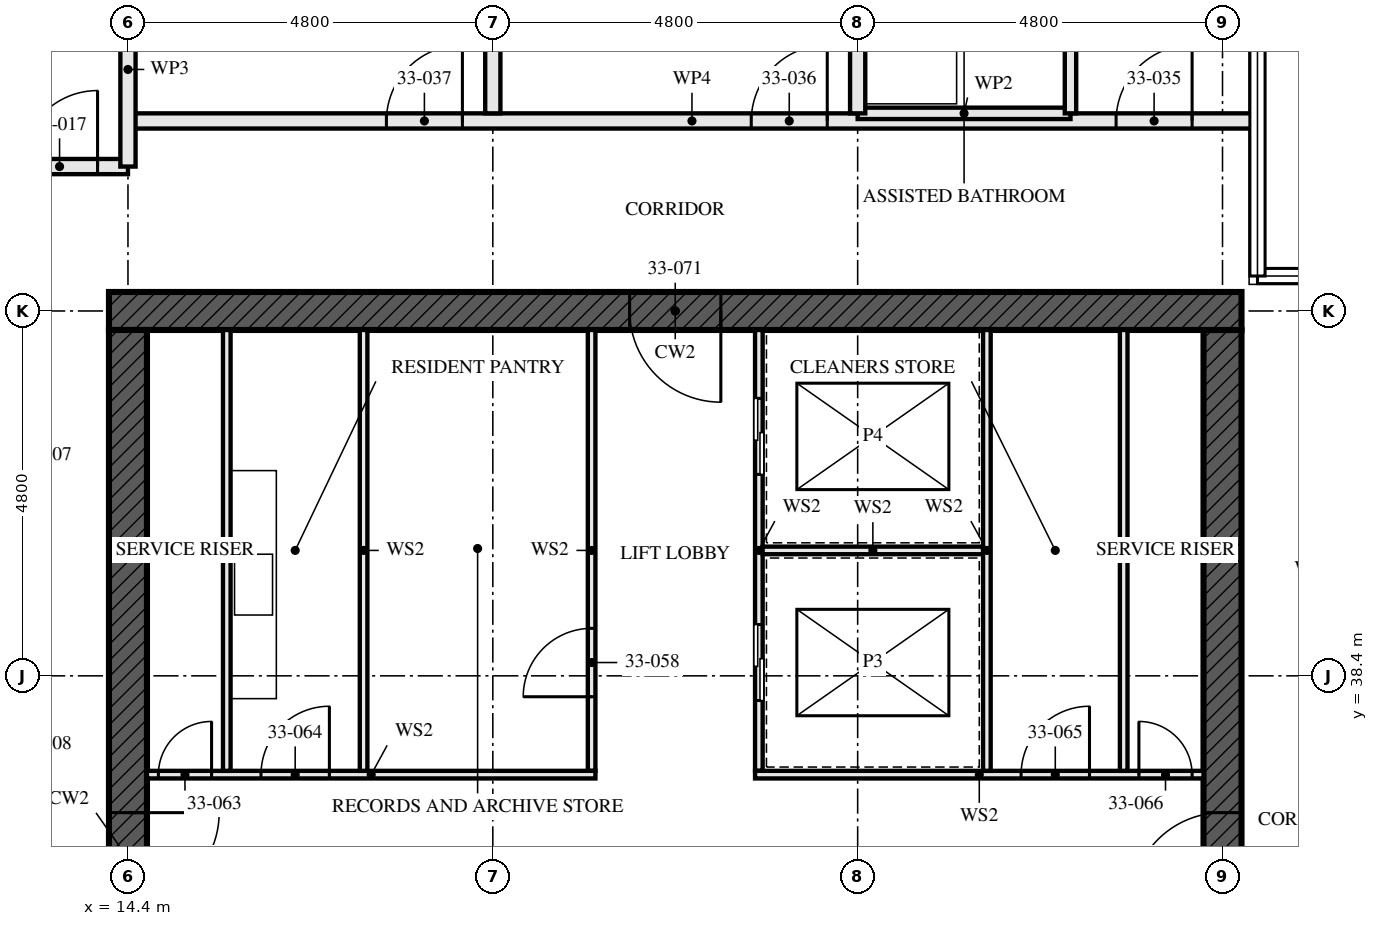
"""IFC4 building model, lengths in metres.
Left out: names, types, materials, properties, quantities, classifications, styles, units other than length and angle.
Written with IfcOpenShell. Run it as: python <this file> out.ifc"""

import sys

from ifc_helpers import new_model, si_unit, direction, frame, frame_2d, origin, place, context, subcontext, project, spatial, rectangle, extrude, element, fill, save


model = new_model("IFC4")
c1 = context("Model", 3, precision=1e-05, world=origin(), true_north=direction((0.0, 1.0)))
c2 = subcontext(c1, "Body", "Model", "MODEL_VIEW")
j1 = project(units=[si_unit("LENGTHUNIT", "METRE"), si_unit("PLANEANGLEUNIT", "RADIAN")], contexts=[c1])
p1 = place(None, origin())
s1 = spatial("IfcSite", under=j1, at=p1, CompositionType="ELEMENT")
p2 = place(p1, origin())
s2 = spatial("IfcBuilding", under=s1, at=p2, CompositionType="ELEMENT")
p3 = place(p2, frame((0.0, 0.0, 122.5)))
s3 = spatial("IfcBuildingStorey", under=s2, at=p3, CompositionType="ELEMENT", Elevation=122.5)
p4 = place(p3, frame((29.05, 43.2, -0.17), z_axis=(0.0, 0.0, 1.0), x_axis=(-1.0, 0.0, 0.0)))
e1 = element("IfcWall", 1, at=p4, inside=s3, PredefinedType="SHEAR", context=c2, shape_type="SweptSolid", body=[
    extrude(rectangle(XDim=14.9, YDim=0.5, at=frame_2d((7.45, 0.0))), origin(), (0.0, 0.0, 1.0), 3.5),
])
p5 = place(p4, frame((6.85, 0.0, 0.17)))
e2 = element("IfcOpeningElement", 2, at=p5, cuts=e1, PredefinedType="OPENING", context=c2, shape_type="SweptSolid", body=[
    extrude(rectangle(XDim=1.2, YDim=2.1, at=frame_2d((0.6, 1.05))), frame((0.0, 0.26, 0.0), z_axis=(0.0, -1.0, 0.0), x_axis=(1.0, 0.0, 0.0)), (0.0, 0.0, 1.0), 0.521),
])
p6 = place(p3, frame((14.4, 42.95, -0.17), z_axis=(0.0, 0.0, 1.0), x_axis=(0.0, -1.0, 0.0)))
e3 = element("IfcWall", 3, at=p6, inside=s3, PredefinedType="SHEAR", context=c2, shape_type="SweptSolid", body=[
    extrude(rectangle(XDim=13.9, YDim=0.5, at=frame_2d((6.95, 0.0))), origin(), (0.0, 0.0, 1.0), 3.5),
])
p7 = place(p6, frame((6.35, 0.0, 0.17)))
e4 = element("IfcOpeningElement", 4, at=p7, cuts=e3, PredefinedType="OPENING", context=c2, shape_type="SweptSolid", body=[
    extrude(rectangle(XDim=1.2, YDim=2.1, at=frame_2d((0.6, 1.05))), frame((0.0, 0.26, 0.0), z_axis=(0.0, -1.0, 0.0), x_axis=(1.0, 0.0, 0.0)), (0.0, 0.0, 1.0), 0.521),
])
p8 = place(p3, frame((28.8, 29.05, -0.17), z_axis=(0.0, 0.0, 1.0), x_axis=(0.0, 1.0, 0.0)))
e5 = element("IfcWall", 5, at=p8, inside=s3, PredefinedType="SHEAR", context=c2, shape_type="SweptSolid", body=[
    extrude(rectangle(XDim=13.9, YDim=0.5, at=frame_2d((6.95, 0.0))), origin(), (0.0, 0.0, 1.0), 3.5),
])
p9 = place(p8, frame((6.35, 0.0, 0.17)))
e6 = element("IfcOpeningElement", 6, at=p9, cuts=e5, PredefinedType="OPENING", context=c2, shape_type="SweptSolid", body=[
    extrude(rectangle(XDim=1.2, YDim=2.1, at=frame_2d((0.6, 1.05))), frame((0.0, 0.26, 0.0), z_axis=(0.0, -1.0, 0.0), x_axis=(1.0, 0.0, 0.0)), (0.0, 0.0, 1.0), 0.521),
])
p10 = place(p3, frame((14.4, 45.1, 0.0), z_axis=(0.0, 0.0, 1.0), x_axis=(-1.0, 0.0, 0.0)))
e7 = element("IfcWall", 7, at=p10, inside=s3, PredefinedType="PARTITIONING", context=c2, shape_type="SweptSolid", body=[
    extrude(rectangle(XDim=9.6, YDim=0.2, at=frame_2d((4.8, 0.0))), origin(), (0.0, 0.0, 1.0), 3.33),
])
p11 = place(p10, frame((0.4, 0.0, 0.0)))
e8 = element("IfcOpeningElement", 8, at=p11, cuts=e7, PredefinedType="OPENING", context=c2, shape_type="SweptSolid", body=[
    extrude(rectangle(XDim=1.0, YDim=2.1, at=frame_2d((0.5, 1.05))), frame((0.0, 0.111, 0.0), z_axis=(0.0, -1.0, 0.0), x_axis=(1.0, 0.0, 0.0)), (0.0, 0.0, 1.0), 0.221),
])
p12 = place(p10, frame((5.2, 0.0, 0.0)))
e9 = element("IfcOpeningElement", 9, at=p12, cuts=e7, PredefinedType="OPENING", context=c2, shape_type="SweptSolid", body=[
    extrude(rectangle(XDim=1.0, YDim=2.1, at=frame_2d((0.5, 1.05))), frame((0.0, 0.111, 0.0), z_axis=(0.0, -1.0, 0.0), x_axis=(1.0, 0.0, 0.0)), (0.0, 0.0, 1.0), 0.221),
])
p13 = place(p3, frame((26.8, 48.8, 0.0), z_axis=(0.0, 0.0, 1.0), x_axis=(0.0, -1.0, 0.0)))
e10 = element("IfcWall", 10, at=p13, inside=s3, PredefinedType="PARTITIONING", context=c2, shape_type="SweptSolid", body=[
    extrude(rectangle(XDim=3.0, YDim=0.15, at=frame_2d((1.5, 0.0))), origin(), (0.0, 0.0, 1.0), 2.55),
])
p14 = place(p13, frame((1.05, 0.0, 0.0)))
e11 = element("IfcOpeningElement", 11, at=p14, cuts=e10, PredefinedType="OPENING", context=c2, shape_type="SweptSolid", body=[
    extrude(rectangle(XDim=0.9, YDim=2.1, at=frame_2d((0.45, 1.05))), frame((0.0, 0.085, 0.0), z_axis=(0.0, -1.0, 0.0), x_axis=(1.0, 0.0, 0.0)), (0.0, 0.0, 1.0), 0.171),
])
p15 = place(p3, frame((26.8, 45.8, 0.0), z_axis=(0.0, 0.0, 1.0), x_axis=(-1.0, 0.0, 0.0)))
e12 = element("IfcWall", 12, at=p15, inside=s3, PredefinedType="PARTITIONING", context=c2, shape_type="SweptSolid", body=[
    extrude(rectangle(XDim=2.8, YDim=0.15, at=frame_2d((1.4, 0.0))), origin(), (0.0, 0.0, 1.0), 3.33),
])
p16 = place(p3, frame((24.0, 52.48, 0.0), z_axis=(0.0, 0.0, 1.0), x_axis=(0.0, -1.0, 0.0)))
e13 = element("IfcWall", 13, at=p16, inside=s3, PredefinedType="PARTITIONING", context=c2, shape_type="SweptSolid", body=[
    extrude(rectangle(XDim=6.68, YDim=0.2, at=frame_2d((3.34, 0.0))), origin(), (0.0, 0.0, 1.0), 2.55),
])
p17 = place(p3, frame((19.2, 57.28, 0.0), z_axis=(0.0, 0.0, 1.0), x_axis=(0.0, -1.0, 0.0)))
e14 = element("IfcWall", 14, at=p17, inside=s3, PredefinedType="PARTITIONING", context=c2, shape_type="SweptSolid", body=[
    extrude(rectangle(XDim=11.48, YDim=0.2, at=frame_2d((5.74, 0.0))), origin(), (0.0, 0.0, 1.0), 2.55),
])
p18 = place(p3, frame((29.24, 45.7, 0.0), z_axis=(0.0, 0.0, 1.0), x_axis=(-1.0, 0.0, 0.0)))
e15 = element("IfcWall", 15, at=p18, inside=s3, PredefinedType="PARTITIONING", context=c2, shape_type="SweptSolid", body=[
    extrude(rectangle(XDim=14.84, YDim=0.2, at=frame_2d((7.42, 0.0))), origin(), (0.0, 0.0, 1.0), 2.32),
])
p19 = place(p18, frame((0.84, 0.0, 0.0)))
e16 = element("IfcOpeningElement", 16, at=p19, cuts=e15, PredefinedType="OPENING", context=c2, shape_type="SweptSolid", body=[
    extrude(rectangle(XDim=1.0, YDim=2.1, at=frame_2d((0.5, 1.05))), frame((0.0, 0.111, 0.0), z_axis=(0.0, -1.0, 0.0), x_axis=(1.0, 0.0, 0.0)), (0.0, 0.0, 1.0), 0.221),
])
p20 = place(p18, frame((5.64, 0.0, 0.0)))
e17 = element("IfcOpeningElement", 17, at=p20, cuts=e15, PredefinedType="OPENING", context=c2, shape_type="SweptSolid", body=[
    extrude(rectangle(XDim=1.0, YDim=2.1, at=frame_2d((0.5, 1.05))), frame((0.0, 0.111, 0.0), z_axis=(0.0, -1.0, 0.0), x_axis=(1.0, 0.0, 0.0)), (0.0, 0.0, 1.0), 0.221),
])
p21 = place(p18, frame((10.44, 0.0, 0.0)))
e18 = element("IfcOpeningElement", 18, at=p21, cuts=e15, PredefinedType="OPENING", context=c2, shape_type="SweptSolid", body=[
    extrude(rectangle(XDim=1.0, YDim=2.1, at=frame_2d((0.5, 1.05))), frame((0.0, 0.111, 0.0), z_axis=(0.0, -1.0, 0.0), x_axis=(1.0, 0.0, 0.0)), (0.0, 0.0, 1.0), 0.221),
])
for number, where, z_axis, x_axis in (
    (19, (15.7, 37.15, 0.0), (0.0, 0.0, 1.0), (0.0, 1.0, 0.0)),
    (20, (27.5, 37.15, 0.0), (0.0, 0.0, 1.0), (0.0, 1.0, 0.0)),
):
    element("IfcWall", number, at=place(p3, frame(where, z_axis=z_axis, x_axis=x_axis)), inside=s3, PredefinedType="SOLIDWALL", context=c2, shape_type="SweptSolid", body=[
        extrude(rectangle(XDim=5.8, YDim=0.1, at=frame_2d((2.9, 0.0))), origin(), (0.0, 0.0, 1.0), 3.33),
    ])
p22 = place(p3, frame((20.5, 37.15, 0.0), z_axis=(0.0, 0.0, 1.0), x_axis=(0.0, 1.0, 0.0)))
e21 = element("IfcWall", 21, at=p22, inside=s3, PredefinedType="SOLIDWALL", context=c2, shape_type="SweptSolid", body=[
    extrude(rectangle(XDim=5.8, YDim=0.1, at=frame_2d((2.9, 0.0))), origin(), (0.0, 0.0, 1.0), 3.33),
])
p23 = place(p22, frame((0.975, 0.0, 0.0)))
e22 = element("IfcOpeningElement", 22, at=p23, cuts=e21, PredefinedType="OPENING", context=c2, shape_type="SweptSolid", body=[
    extrude(rectangle(XDim=0.9, YDim=2.1, at=frame_2d((0.45, 1.05))), frame((0.0, 0.061, 0.0), z_axis=(0.0, -1.0, 0.0), x_axis=(1.0, 0.0, 0.0)), (0.0, 0.0, 1.0), 0.121),
])
p24 = place(p3, frame((22.7, 37.15, 0.0), z_axis=(0.0, 0.0, 1.0), x_axis=(0.0, 1.0, 0.0)))
e23 = element("IfcWall", 23, at=p24, inside=s3, PredefinedType="SOLIDWALL", context=c2, shape_type="SweptSolid", body=[
    extrude(rectangle(XDim=5.8, YDim=0.1, at=frame_2d((2.9, 0.0))), origin(), (0.0, 0.0, 1.0), 3.33),
])
p25 = place(p24, frame((0.925, 0.0, 0.0)))
e24 = element("IfcOpeningElement", 24, at=p25, cuts=e23, PredefinedType="OPENING", context=c2, shape_type="SweptSolid", body=[
    extrude(rectangle(XDim=1.0, YDim=2.1, at=frame_2d((0.5, 1.05))), frame((0.0, 0.061, 0.0), z_axis=(0.0, -1.0, 0.0), x_axis=(1.0, 0.0, 0.0)), (0.0, 0.0, 1.0), 0.121),
])
p26 = place(p24, frame((3.9, 0.0, 0.0)))
e25 = element("IfcOpeningElement", 25, at=p26, cuts=e23, PredefinedType="OPENING", context=c2, shape_type="SweptSolid", body=[
    extrude(rectangle(XDim=1.0, YDim=2.1, at=frame_2d((0.5, 1.05))), frame((0.0, 0.061, 0.0), z_axis=(0.0, -1.0, 0.0), x_axis=(1.0, 0.0, 0.0)), (0.0, 0.0, 1.0), 0.121),
])
p27 = place(p3, frame((14.65, 37.1, 0.0), z_axis=(0.0, 0.0, 1.0), x_axis=(1.0, 0.0, 0.0)))
e26 = element("IfcWall", 26, at=p27, inside=s3, PredefinedType="SOLIDWALL", context=c2, shape_type="SweptSolid", body=[
    extrude(rectangle(XDim=5.9, YDim=0.1, at=frame_2d((2.95, 0.0))), origin(), (0.0, 0.0, 1.0), 3.33),
])
p28 = place(p27, frame((0.15, 0.0, 0.0)))
e27 = element("IfcOpeningElement", 27, at=p28, cuts=e26, PredefinedType="OPENING", context=c2, shape_type="SweptSolid", body=[
    extrude(rectangle(XDim=0.7, YDim=2.1, at=frame_2d((0.35, 1.05))), frame((0.0, 0.061, 0.0), z_axis=(0.0, -1.0, 0.0), x_axis=(1.0, 0.0, 0.0)), (0.0, 0.0, 1.0), 0.121),
])
p29 = place(p27, frame((1.5, 0.0, 0.0)))
e28 = element("IfcOpeningElement", 28, at=p29, cuts=e26, PredefinedType="OPENING", context=c2, shape_type="SweptSolid", body=[
    extrude(rectangle(XDim=0.9, YDim=2.1, at=frame_2d((0.45, 1.05))), frame((0.0, 0.061, 0.0), z_axis=(0.0, -1.0, 0.0), x_axis=(1.0, 0.0, 0.0)), (0.0, 0.0, 1.0), 0.121),
])
p30 = place(p3, frame((22.65, 37.1, 0.0), z_axis=(0.0, 0.0, 1.0), x_axis=(1.0, 0.0, 0.0)))
e29 = element("IfcWall", 29, at=p30, inside=s3, PredefinedType="SOLIDWALL", context=c2, shape_type="SweptSolid", body=[
    extrude(rectangle(XDim=5.9, YDim=0.1, at=frame_2d((2.95, 0.0))), origin(), (0.0, 0.0, 1.0), 3.33),
])
p31 = place(p30, frame((3.5, 0.0, 0.0)))
e30 = element("IfcOpeningElement", 30, at=p31, cuts=e29, PredefinedType="OPENING", context=c2, shape_type="SweptSolid", body=[
    extrude(rectangle(XDim=0.9, YDim=2.1, at=frame_2d((0.45, 1.05))), frame((0.0, 0.061, 0.0), z_axis=(0.0, -1.0, 0.0), x_axis=(1.0, 0.0, 0.0)), (0.0, 0.0, 1.0), 0.121),
])
p32 = place(p30, frame((5.05, 0.0, 0.0)))
e31 = element("IfcOpeningElement", 31, at=p32, cuts=e29, PredefinedType="OPENING", context=c2, shape_type="SweptSolid", body=[
    extrude(rectangle(XDim=0.7, YDim=2.1, at=frame_2d((0.35, 1.05))), frame((0.0, 0.061, 0.0), z_axis=(0.0, -1.0, 0.0), x_axis=(1.0, 0.0, 0.0)), (0.0, 0.0, 1.0), 0.121),
])
p33 = place(p3, frame((17.5, 37.15, 0.0), z_axis=(0.0, 0.0, 1.0), x_axis=(0.0, 1.0, 0.0)))
e32 = element("IfcWall", 32, at=p33, inside=s3, PredefinedType="SOLIDWALL", context=c2, shape_type="SweptSolid", body=[
    extrude(rectangle(XDim=5.8, YDim=0.1, at=frame_2d((2.9, 0.0))), origin(), (0.0, 0.0, 1.0), 3.33),
])
p34 = place(p3, frame((22.75, 40.05, 0.0), z_axis=(0.0, 0.0, 1.0), x_axis=(1.0, 0.0, 0.0)))
e33 = element("IfcWall", 33, at=p34, inside=s3, PredefinedType="SOLIDWALL", context=c2, shape_type="SweptSolid", body=[
    extrude(rectangle(XDim=2.9, YDim=0.1, at=frame_2d((1.45, 0.0))), origin(), (0.0, 0.0, 1.0), 3.33),
])
p35 = place(p3, frame((25.7, 37.15, 0.0), z_axis=(0.0, 0.0, 1.0), x_axis=(0.0, 1.0, 0.0)))
e34 = element("IfcWall", 34, at=p35, inside=s3, PredefinedType="SOLIDWALL", context=c2, shape_type="SweptSolid", body=[
    extrude(rectangle(XDim=5.8, YDim=0.1, at=frame_2d((2.9, 0.0))), origin(), (0.0, 0.0, 1.0), 3.33),
])
p36 = place(p3, frame((14.4, 45.1, 0.0), z_axis=(0.0, 0.0, 1.0), x_axis=(0.0, 1.0, 0.0)))
e35 = element("IfcWall", 35, at=p36, inside=s3, PredefinedType="PARTITIONING", context=c2, shape_type="SweptSolid", body=[
    extrude(rectangle(XDim=2.555, YDim=0.2, at=frame_2d((1.277, 0.0))), origin(), (0.0, 0.0, 1.0), 2.32),
])
p37 = place(p11, frame((1.0, 0.0, 0.0), z_axis=(0.0, 0.0, 1.0), x_axis=(-1.0, 0.0, 0.0)))
e36 = element("IfcDoor", 36, at=p37, inside=s3, OperationType="SINGLE_SWING_LEFT", PredefinedType="DOOR", context=c2, shape_type="SweptSolid", body=[
    extrude(rectangle(XDim=1.0, YDim=2.1, at=frame_2d((0.5, 1.05))), frame((0.0, 0.027, 0.0), z_axis=(0.0, -1.0, 0.0), x_axis=(1.0, 0.0, 0.0)), (0.0, 0.0, 1.0), 0.054),
])
fill(e8, e36)
p38 = place(p19, frame((1.0, 0.0, 0.0), z_axis=(0.0, 0.0, 1.0), x_axis=(-1.0, 0.0, 0.0)))
e37 = element("IfcDoor", 37, at=p38, inside=s3, OperationType="SINGLE_SWING_LEFT", PredefinedType="DOOR", context=c2, shape_type="SweptSolid", body=[
    extrude(rectangle(XDim=1.0, YDim=2.1, at=frame_2d((0.5, 1.05))), frame((0.0, 0.027, 0.0), z_axis=(0.0, -1.0, 0.0), x_axis=(1.0, 0.0, 0.0)), (0.0, 0.0, 1.0), 0.054),
])
fill(e16, e37)
p39 = place(p20, frame((1.0, 0.0, 0.0), z_axis=(0.0, 0.0, 1.0), x_axis=(-1.0, 0.0, 0.0)))
e38 = element("IfcDoor", 38, at=p39, inside=s3, OperationType="SINGLE_SWING_LEFT", PredefinedType="DOOR", context=c2, shape_type="SweptSolid", body=[
    extrude(rectangle(XDim=1.0, YDim=2.1, at=frame_2d((0.5, 1.05))), frame((0.0, 0.027, 0.0), z_axis=(0.0, -1.0, 0.0), x_axis=(1.0, 0.0, 0.0)), (0.0, 0.0, 1.0), 0.054),
])
fill(e17, e38)
p40 = place(p21, frame((1.0, 0.0, 0.0), z_axis=(0.0, 0.0, 1.0), x_axis=(-1.0, 0.0, 0.0)))
e39 = element("IfcDoor", 39, at=p40, inside=s3, OperationType="SINGLE_SWING_LEFT", PredefinedType="DOOR", context=c2, shape_type="SweptSolid", body=[
    extrude(rectangle(XDim=1.0, YDim=2.1, at=frame_2d((0.5, 1.05))), frame((0.0, 0.027, 0.0), z_axis=(0.0, -1.0, 0.0), x_axis=(1.0, 0.0, 0.0)), (0.0, 0.0, 1.0), 0.054),
])
fill(e18, e39)
p41 = place(p23, origin())
e40 = element("IfcDoor", 40, at=p41, inside=s3, OperationType="SINGLE_SWING_RIGHT", PredefinedType="DOOR", context=c2, shape_type="SweptSolid", body=[
    extrude(rectangle(XDim=0.9, YDim=2.1, at=frame_2d((0.45, 1.05))), frame((0.0, 0.027, 0.0), z_axis=(0.0, -1.0, 0.0), x_axis=(1.0, 0.0, 0.0)), (0.0, 0.0, 1.0), 0.054),
])
fill(e22, e40)
p42 = place(p25, origin())
e41 = element("IfcDoor", 41, at=p42, inside=s3, OperationType="SLIDING_TO_LEFT", PredefinedType="DOOR", context=c2, shape_type="SweptSolid", body=[
    extrude(rectangle(XDim=1.0, YDim=2.1, at=frame_2d((0.5, 1.05))), frame((0.0, 0.05, 0.0), z_axis=(0.0, -1.0, 0.0), x_axis=(1.0, 0.0, 0.0)), (0.0, 0.0, 1.0), 0.1),
])
fill(e24, e41)
p43 = place(p26, origin())
e42 = element("IfcDoor", 42, at=p43, inside=s3, OperationType="SLIDING_TO_LEFT", PredefinedType="DOOR", context=c2, shape_type="SweptSolid", body=[
    extrude(rectangle(XDim=1.0, YDim=2.1, at=frame_2d((0.5, 1.05))), frame((0.0, 0.05, 0.0), z_axis=(0.0, -1.0, 0.0), x_axis=(1.0, 0.0, 0.0)), (0.0, 0.0, 1.0), 0.1),
])
fill(e25, e42)
p44 = place(p28, origin())
e43 = element("IfcDoor", 43, at=p44, inside=s3, OperationType="SINGLE_SWING_LEFT", PredefinedType="DOOR", context=c2, shape_type="SweptSolid", body=[
    extrude(rectangle(XDim=0.7, YDim=2.1, at=frame_2d((0.35, 1.05))), frame((0.0, 0.027, 0.0), z_axis=(0.0, -1.0, 0.0), x_axis=(1.0, 0.0, 0.0)), (0.0, 0.0, 1.0), 0.054),
])
fill(e27, e43)
p45 = place(p29, origin())
e44 = element("IfcDoor", 44, at=p45, inside=s3, OperationType="SINGLE_SWING_LEFT", PredefinedType="DOOR", context=c2, shape_type="SweptSolid", body=[
    extrude(rectangle(XDim=0.9, YDim=2.1, at=frame_2d((0.45, 1.05))), frame((0.0, 0.027, 0.0), z_axis=(0.0, -1.0, 0.0), x_axis=(1.0, 0.0, 0.0)), (0.0, 0.0, 1.0), 0.054),
])
fill(e28, e44)
p46 = place(p31, origin())
e45 = element("IfcDoor", 45, at=p46, inside=s3, OperationType="SINGLE_SWING_LEFT", PredefinedType="DOOR", context=c2, shape_type="SweptSolid", body=[
    extrude(rectangle(XDim=0.9, YDim=2.1, at=frame_2d((0.45, 1.05))), frame((0.0, 0.027, 0.0), z_axis=(0.0, -1.0, 0.0), x_axis=(1.0, 0.0, 0.0)), (0.0, 0.0, 1.0), 0.054),
])
fill(e30, e45)
p47 = place(p32, origin())
e46 = element("IfcDoor", 46, at=p47, inside=s3, OperationType="SINGLE_SWING_RIGHT", PredefinedType="DOOR", context=c2, shape_type="SweptSolid", body=[
    extrude(rectangle(XDim=0.7, YDim=2.1, at=frame_2d((0.35, 1.05))), frame((0.0, 0.027, 0.0), z_axis=(0.0, -1.0, 0.0), x_axis=(1.0, 0.0, 0.0)), (0.0, 0.0, 1.0), 0.054),
])
fill(e31, e46)
p48 = place(p7, origin())
e47 = element("IfcDoor", 47, at=p48, inside=s3, OperationType="SINGLE_SWING_LEFT", PredefinedType="DOOR", context=c2, shape_type="SweptSolid", body=[
    extrude(rectangle(XDim=1.2, YDim=2.1, at=frame_2d((0.6, 1.05))), frame((0.0, 0.027, 0.0), z_axis=(0.0, -1.0, 0.0), x_axis=(1.0, 0.0, 0.0)), (0.0, 0.0, 1.0), 0.054),
])
fill(e4, e47)
p49 = place(p9, origin())
e48 = element("IfcDoor", 48, at=p49, inside=s3, OperationType="SINGLE_SWING_LEFT", PredefinedType="DOOR", context=c2, shape_type="SweptSolid", body=[
    extrude(rectangle(XDim=1.2, YDim=2.1, at=frame_2d((0.6, 1.05))), frame((0.0, 0.027, 0.0), z_axis=(0.0, -1.0, 0.0), x_axis=(1.0, 0.0, 0.0)), (0.0, 0.0, 1.0), 0.054),
])
fill(e6, e48)
p50 = place(p5, origin())
e49 = element("IfcDoor", 49, at=p50, inside=s3, OperationType="SINGLE_SWING_LEFT", PredefinedType="DOOR", context=c2, shape_type="SweptSolid", body=[
    extrude(rectangle(XDim=1.2, YDim=2.1, at=frame_2d((0.6, 1.05))), frame((0.0, 0.027, 0.0), z_axis=(0.0, -1.0, 0.0), x_axis=(1.0, 0.0, 0.0)), (0.0, 0.0, 1.0), 0.054),
])
fill(e2, e49)
save(model, sys.argv[1])
